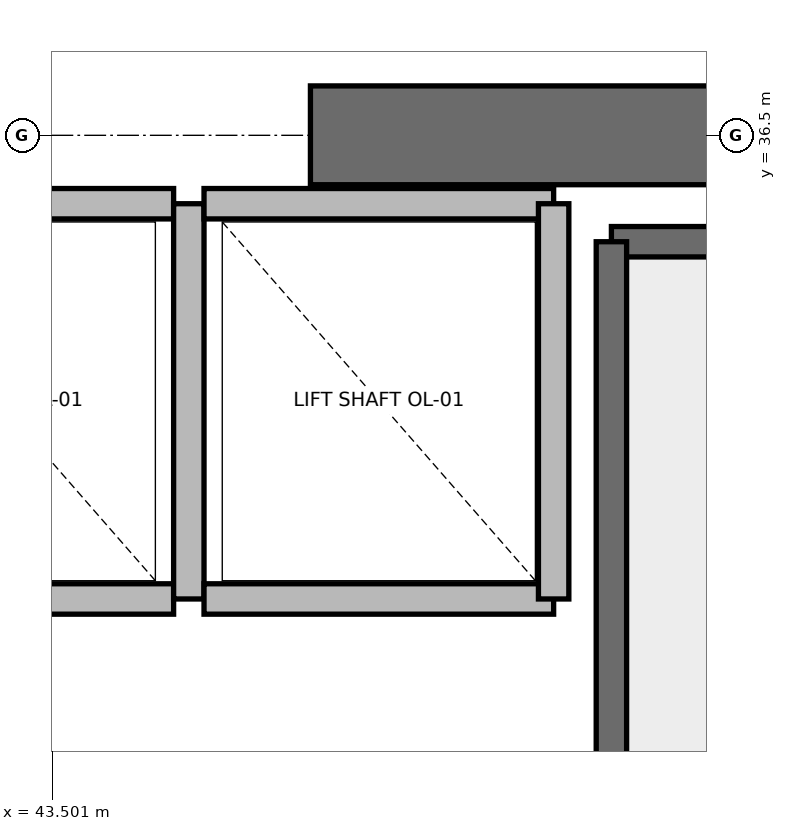
"""IFC4 building model, lengths in metres.
Left out: names, types, materials, properties, quantities, classifications, styles, units other than length and angle.
Written with IfcOpenShell. Run it as: python <this file> out.ifc"""

import sys

from ifc_helpers import new_model, si_unit, direction, frame, frame_2d, origin, place, context, subcontext, project, spatial, rectangle, extrude, element, save


model = new_model("IFC4")
c1 = context("Model", 3, precision=1e-05, world=origin(), true_north=direction((0.0, 1.0)))
c2 = subcontext(c1, "Body", "Model", "MODEL_VIEW")
j1 = project(units=[si_unit("LENGTHUNIT", "METRE"), si_unit("PLANEANGLEUNIT", "RADIAN")], contexts=[c1])
p1 = place(None, origin())
s1 = spatial("IfcSite", under=j1, at=p1, CompositionType="ELEMENT")
p2 = place(p1, origin())
s2 = spatial("IfcBuilding", under=s1, at=p2, CompositionType="ELEMENT")
p3 = place(p2, frame((0.0, 0.0, 91.6)))
s3 = spatial("IfcBuildingStorey", under=s2, at=p3, CompositionType="ELEMENT", Elevation=91.6)
p4 = place(p3, frame((45.2, 36.5, 0.0), z_axis=(0.0, 0.0, 1.0), x_axis=(1.0, 0.0, 0.0)))
e1 = element("IfcWall", 1, at=p4, inside=s3, PredefinedType="SHEAR", context=c2, shape_type="SweptSolid", body=[
    extrude(rectangle(XDim=5.8, YDim=0.65, at=frame_2d((2.9, 0.0))), origin(), (0.0, 0.0, 1.0), 3.76),
])
p5 = place(p3, frame((47.18, 35.8, 0.0), z_axis=(0.0, 0.0, 1.0), x_axis=(1.0, 0.0, 0.0)))
e2 = element("IfcWall", 2, at=p5, inside=s3, PredefinedType="SOLIDWALL", context=c2, shape_type="SweptSolid", body=[
    extrude(rectangle(XDim=3.12, YDim=0.2, at=frame_2d((1.56, 0.0))), origin(), (0.0, 0.0, 1.0), 3.76),
])
p6 = place(p3, frame((47.18, 27.62, 0.0), z_axis=(0.0, 0.0, 1.0), x_axis=(0.0, 1.0, 0.0)))
e3 = element("IfcWall", 3, at=p6, inside=s3, PredefinedType="SOLIDWALL", context=c2, shape_type="SweptSolid", body=[
    extrude(rectangle(XDim=8.18, YDim=0.2, at=frame_2d((4.09, 0.0))), origin(), (0.0, 0.0, 1.0), 3.76),
])
p7 = place(p3, frame((42.0, 33.45, 0.0), z_axis=(0.0, 0.0, 1.0), x_axis=(1.0, 0.0, 0.0)))
e4 = element("IfcWall", 4, at=p7, inside=s3, PredefinedType="SOLIDWALL", context=c2, shape_type="SweptSolid", body=[
    extrude(rectangle(XDim=2.3, YDim=0.2, at=frame_2d((1.15, 0.0))), origin(), (0.0, 0.0, 1.0), 3.76),
])
p8 = place(p3, frame((44.3, 36.05, 0.0), z_axis=(0.0, 0.0, 1.0), x_axis=(-1.0, 0.0, 0.0)))
e5 = element("IfcWall", 5, at=p8, inside=s3, PredefinedType="SOLIDWALL", context=c2, shape_type="SweptSolid", body=[
    extrude(rectangle(XDim=2.3, YDim=0.2, at=frame_2d((1.15, 0.0))), origin(), (0.0, 0.0, 1.0), 2.54),
])
p9 = place(p3, frame((44.4, 33.45, 0.0), z_axis=(0.0, 0.0, 1.0), x_axis=(0.0, 1.0, 0.0)))
e6 = element("IfcWall", 6, at=p9, inside=s3, PredefinedType="SOLIDWALL", context=c2, shape_type="SweptSolid", body=[
    extrude(rectangle(XDim=2.6, YDim=0.2, at=frame_2d((1.3, 0.0))), origin(), (0.0, 0.0, 1.0), 2.54),
])
p10 = place(p3, frame((44.5, 33.45, 0.0), z_axis=(0.0, 0.0, 1.0), x_axis=(1.0, 0.0, 0.0)))
e7 = element("IfcWall", 7, at=p10, inside=s3, PredefinedType="SOLIDWALL", context=c2, shape_type="SweptSolid", body=[
    extrude(rectangle(XDim=2.3, YDim=0.2, at=frame_2d((1.15, 0.0))), origin(), (0.0, 0.0, 1.0), 3.76),
])
p11 = place(p3, frame((46.8, 36.05, 0.0), z_axis=(0.0, 0.0, 1.0), x_axis=(-1.0, 0.0, 0.0)))
e8 = element("IfcWall", 8, at=p11, inside=s3, PredefinedType="SOLIDWALL", context=c2, shape_type="SweptSolid", body=[
    extrude(rectangle(XDim=2.3, YDim=0.2, at=frame_2d((1.15, 0.0))), origin(), (0.0, 0.0, 1.0), 2.54),
])
p12 = place(p3, frame((46.8, 33.45, 0.0), z_axis=(0.0, 0.0, 1.0), x_axis=(0.0, 1.0, 0.0)))
e9 = element("IfcWall", 9, at=p12, inside=s3, PredefinedType="SOLIDWALL", context=c2, shape_type="SweptSolid", body=[
    extrude(rectangle(XDim=2.6, YDim=0.2, at=frame_2d((1.3, 0.0))), origin(), (0.0, 0.0, 1.0), 3.76),
])
save(model, sys.argv[1])
